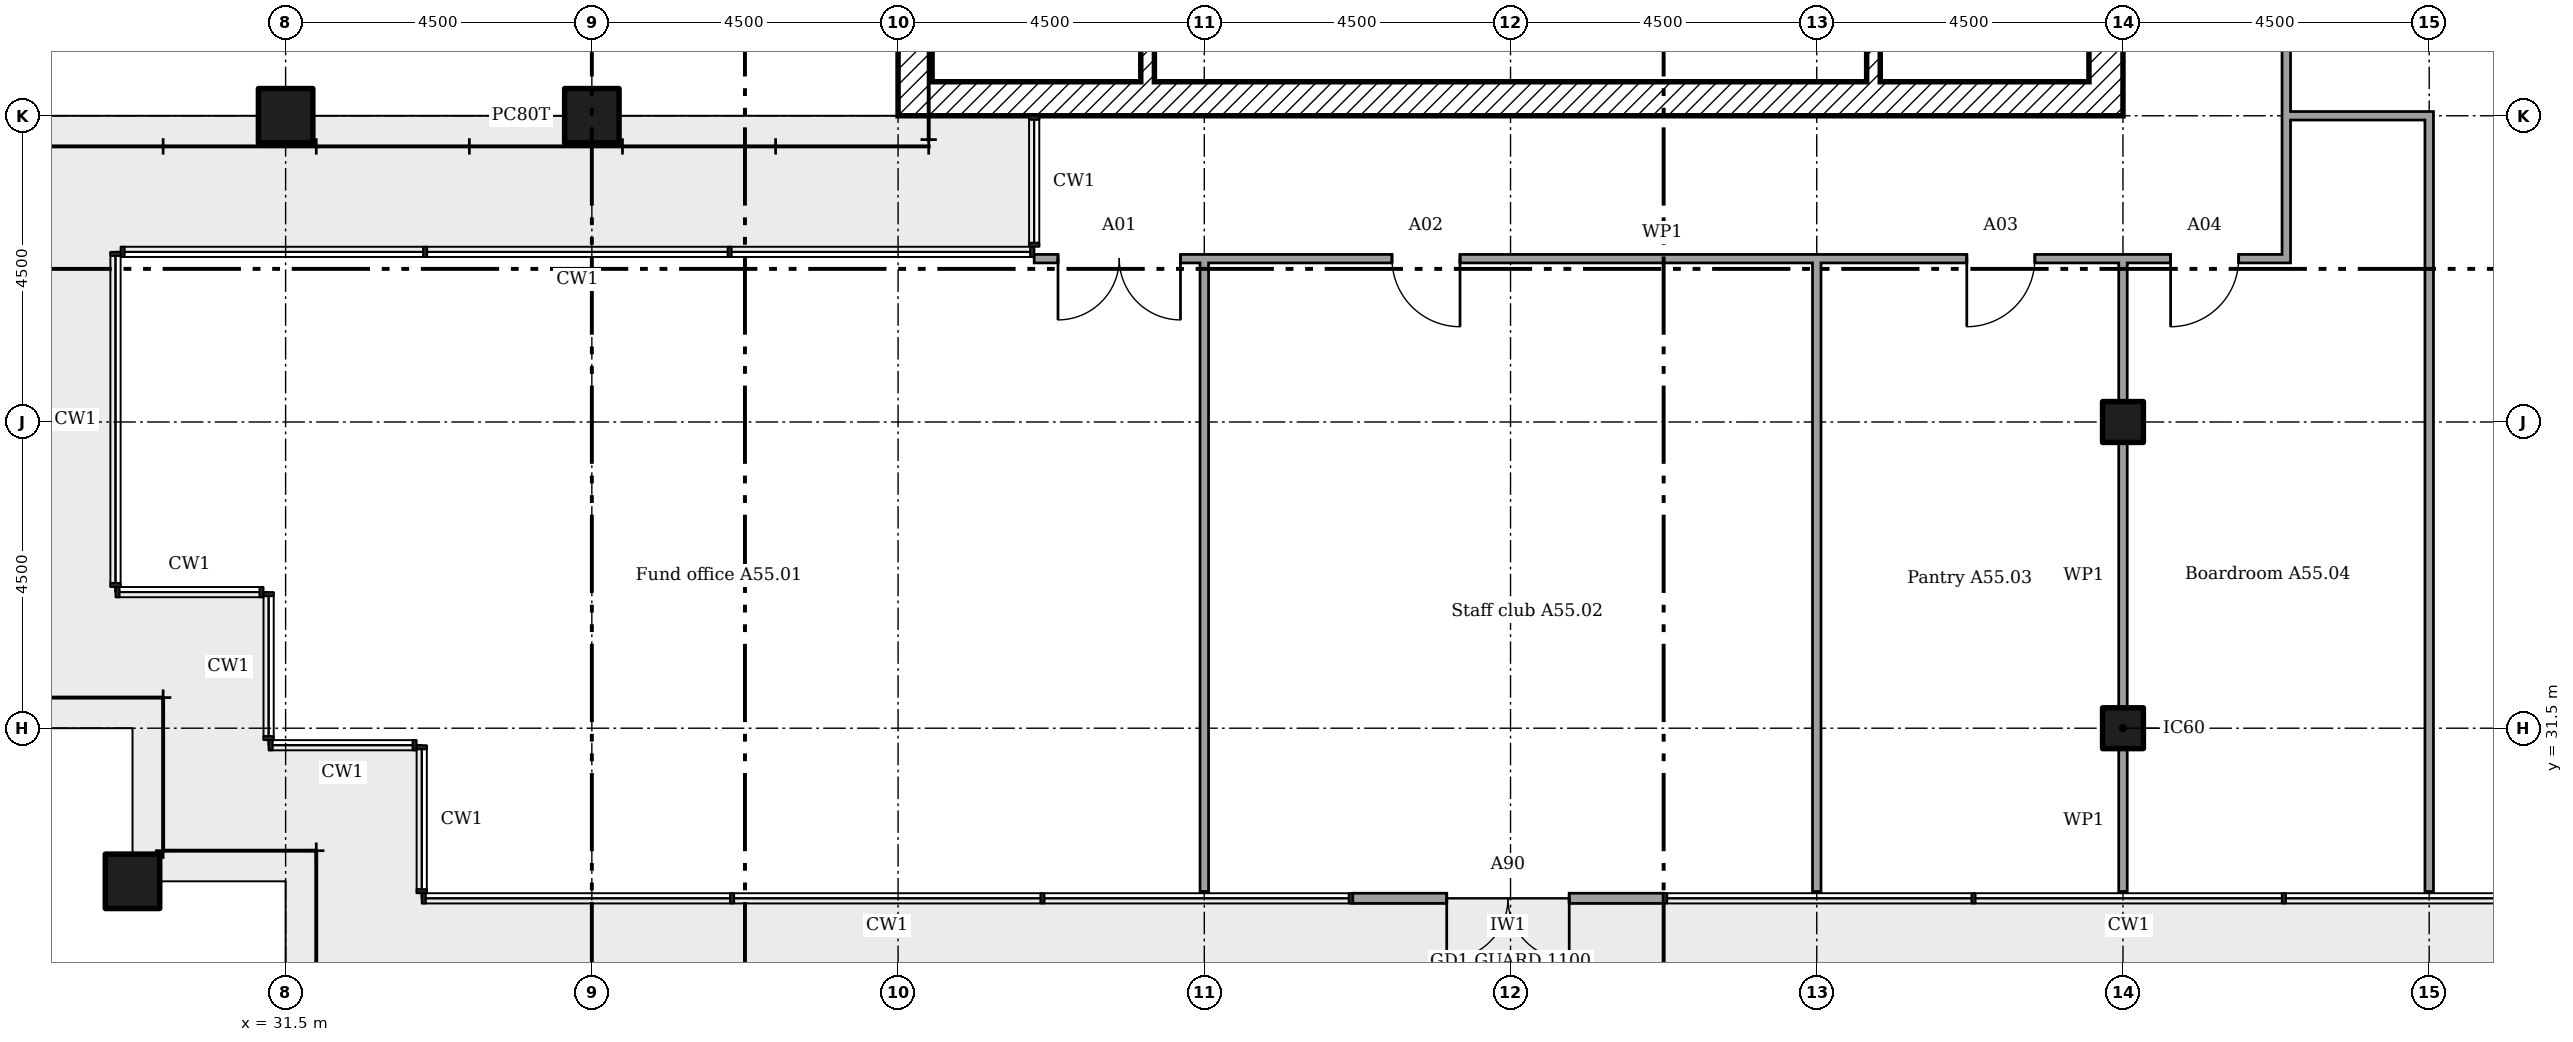
"""IFC4 building model, lengths in metres.
Left out: names, types, materials, properties, quantities, classifications, styles, units other than length and angle.
Written with IfcOpenShell. Run it as: python <this file> out.ifc"""

import sys

from ifc_helpers import new_model, si_unit, direction, frame, frame_2d, origin, origin_2d, place, context, subcontext, project, spatial, rectangle, extrude, element, fill, save


model = new_model("IFC4")
c1 = context("Model", 3, precision=1e-05, world=origin(), true_north=direction((0.0, 1.0)))
c2 = subcontext(c1, "Body", "Model", "MODEL_VIEW")
j1 = project(units=[si_unit("LENGTHUNIT", "METRE"), si_unit("PLANEANGLEUNIT", "RADIAN")], contexts=[c1])
p1 = place(None, origin())
s1 = spatial("IfcSite", under=j1, at=p1, CompositionType="ELEMENT")
p2 = place(p1, origin())
s2 = spatial("IfcBuilding", under=s1, at=p2, CompositionType="ELEMENT")
p3 = place(p2, frame((0.0, 0.0, 217.2)))
s3 = spatial("IfcBuildingStorey", under=s2, at=p3, CompositionType="ELEMENT", Elevation=217.2)
for number, where in (
    (1, (36.0, 40.5, 0.0)),
    (2, (31.5, 40.5, 0.0)),
    (3, (29.25, 29.25, 0.0)),
):
    element("IfcColumn", number, at=place(p3, frame(where)), inside=s3, PredefinedType="COLUMN", context=c2, shape_type="SweptSolid", body=[
        extrude(rectangle(XDim=0.8, YDim=0.8, at=origin_2d()), origin(), (0.0, 0.0, 1.0), 3.6),
    ])
for number, where in (
    (4, (58.5, 31.5, 0.0)),
    (5, (58.5, 36.0, 0.0)),
):
    element("IfcColumn", number, at=place(p3, frame(where)), inside=s3, PredefinedType="COLUMN", context=c2, shape_type="SweptSolid", body=[
        extrude(rectangle(XDim=0.6, YDim=0.6, at=origin_2d()), origin(), (0.0, 0.0, 1.0), 3.6),
    ])
p4 = place(p3, frame((47.182, 29.0, 0.0)))
e6 = element("IfcWall", 6, at=p4, inside=s3, PredefinedType="SOLIDWALL", context=c2, shape_type="SweptSolid", body=[
    extrude(rectangle(XDim=4.561, YDim=0.15, at=frame_2d((2.28, 0.0))), origin(), (0.0, 0.0, 1.0), 3.45),
])
p5 = place(p4, frame((1.38, 0.0, 0.0)))
e7 = element("IfcOpeningElement", 7, at=p5, cuts=e6, PredefinedType="OPENING", context=c2, shape_type="SweptSolid", body=[
    extrude(rectangle(XDim=1.8, YDim=2.4, at=frame_2d((0.9, 1.2))), frame((0.0, 0.085, 0.0), z_axis=(0.0, -1.0, 0.0), x_axis=(1.0, 0.0, 0.0)), (0.0, 0.0, 1.0), 0.17),
])
p6 = place(p3, frame((58.25, 40.5, 0.0), z_axis=(0.0, 0.0, 1.0), x_axis=(0.0, 1.0, 0.0)))
e8 = element("IfcWall", 8, at=p6, inside=s3, PredefinedType="SHEAR", context=c2, shape_type="SweptSolid", body=[
    extrude(rectangle(XDim=18.0, YDim=0.5, at=frame_2d((9.0, 0.0))), origin(), (0.0, 0.0, 1.0), 3.35),
])
p7 = place(p6, frame((13.15, 0.0, 0.0)))
e9 = element("IfcOpeningElement", 9, at=p7, cuts=e8, PredefinedType="OPENING", context=c2, shape_type="SweptSolid", body=[
    extrude(rectangle(XDim=1.2, YDim=2.1, at=frame_2d((0.6, 1.05))), frame((0.0, 0.26, 0.0), z_axis=(0.0, -1.0, 0.0), x_axis=(1.0, 0.0, 0.0)), (0.0, 0.0, 1.0), 0.52),
])
p8 = place(p6, frame((3.9, 0.0, 0.0)))
e10 = element("IfcOpeningElement", 10, at=p8, cuts=e8, PredefinedType="OPENING", context=c2, shape_type="SweptSolid", body=[
    extrude(rectangle(XDim=1.8, YDim=2.1, at=frame_2d((0.9, 1.05))), frame((0.0, 0.26, 0.0), z_axis=(0.0, -1.0, 0.0), x_axis=(1.0, 0.0, 0.0)), (0.0, 0.0, 1.0), 0.52),
])
p9 = place(p6, frame((11.525, 0.0, 0.0)))
e11 = element("IfcOpeningElement", 11, at=p9, cuts=e8, PredefinedType="OPENING", context=c2, shape_type="SweptSolid", body=[
    extrude(rectangle(XDim=1.0, YDim=2.1, at=frame_2d((0.5, 1.05))), frame((0.0, 0.26, 0.0), z_axis=(0.0, -1.0, 0.0), x_axis=(1.0, 0.0, 0.0)), (0.0, 0.0, 1.0), 0.52),
])
p10 = place(p3, frame((40.5, 40.75, 0.0)))
e12 = element("IfcWall", 12, at=p10, inside=s3, PredefinedType="SHEAR", context=c2, shape_type="SweptSolid", body=[
    extrude(rectangle(XDim=17.5, YDim=0.5, at=frame_2d((8.75, 0.0))), origin(), (0.0, 0.0, 1.0), 3.35),
])
p11 = place(p3, frame((40.75, 41.0, 0.0), z_axis=(0.0, 0.0, 1.0), x_axis=(0.0, 1.0, 0.0)))
e13 = element("IfcWall", 13, at=p11, inside=s3, PredefinedType="SHEAR", context=c2, shape_type="SweptSolid", body=[
    extrude(rectangle(XDim=17.0, YDim=0.5, at=frame_2d((8.5, 0.0))), origin(), (0.0, 0.0, 1.0), 3.35),
])
for number, where, z_axis, x_axis in (
    (14, (44.167, 41.0, 0.0), (0.0, 0.0, 1.0), (0.0, 1.0, 0.0)),
    (15, (54.833, 41.0, 0.0), (0.0, 0.0, 1.0), (0.0, 1.0, 0.0)),
):
    element("IfcWall", number, at=place(p3, frame(where, z_axis=z_axis, x_axis=x_axis)), inside=s3, PredefinedType="SHEAR", context=c2, shape_type="SweptSolid", body=[
        extrude(rectangle(XDim=2.8, YDim=0.2, at=frame_2d((1.4, 0.0))), origin(), (0.0, 0.0, 1.0), 3.35),
    ])
p12 = place(p3, frame((42.5, 38.4, 0.0)))
e16 = element("IfcWall", 16, at=p12, inside=s3, PredefinedType="PARTITIONING", context=c2, shape_type="SweptSolid", body=[
    extrude(rectangle(XDim=18.462, YDim=0.125, at=frame_2d((9.231, 0.0))), origin(), (0.0, 0.0, 1.0), 3.45),
])
p13 = place(p12, frame((0.35, 0.0, 0.0)))
e17 = element("IfcOpeningElement", 17, at=p13, cuts=e16, PredefinedType="OPENING", context=c2, shape_type="SweptSolid", body=[
    extrude(rectangle(XDim=1.8, YDim=2.1, at=frame_2d((0.9, 1.05))), frame((0.0, 0.073, 0.0), z_axis=(0.0, -1.0, 0.0), x_axis=(1.0, 0.0, 0.0)), (0.0, 0.0, 1.0), 0.145),
])
p14 = place(p12, frame((5.258, 0.0, 0.0)))
e18 = element("IfcOpeningElement", 18, at=p14, cuts=e16, PredefinedType="OPENING", context=c2, shape_type="SweptSolid", body=[
    extrude(rectangle(XDim=1.0, YDim=2.1, at=frame_2d((0.5, 1.05))), frame((0.0, 0.073, 0.0), z_axis=(0.0, -1.0, 0.0), x_axis=(1.0, 0.0, 0.0)), (0.0, 0.0, 1.0), 0.145),
])
p15 = place(p12, frame((13.705, 0.0, 0.0)))
e19 = element("IfcOpeningElement", 19, at=p15, cuts=e16, PredefinedType="OPENING", context=c2, shape_type="SweptSolid", body=[
    extrude(rectangle(XDim=1.0, YDim=2.1, at=frame_2d((0.5, 1.05))), frame((0.0, 0.073, 0.0), z_axis=(0.0, -1.0, 0.0), x_axis=(1.0, 0.0, 0.0)), (0.0, 0.0, 1.0), 0.145),
])
p16 = place(p12, frame((16.7, 0.0, 0.0)))
e20 = element("IfcOpeningElement", 20, at=p16, cuts=e16, PredefinedType="OPENING", context=c2, shape_type="SweptSolid", body=[
    extrude(rectangle(XDim=1.0, YDim=2.1, at=frame_2d((0.5, 1.05))), frame((0.0, 0.073, 0.0), z_axis=(0.0, -1.0, 0.0), x_axis=(1.0, 0.0, 0.0)), (0.0, 0.0, 1.0), 0.145),
])
p17 = place(p3, frame((60.9, 40.5, 0.0)))
e21 = element("IfcWall", 21, at=p17, inside=s3, PredefinedType="PARTITIONING", context=c2, shape_type="SweptSolid", body=[
    extrude(rectangle(XDim=2.163, YDim=0.125, at=frame_2d((1.081, 0.0))), origin(), (0.0, 0.0, 1.0), 2.772),
])
for number, where, z_axis, x_axis in (
    (22, (45.0, 29.1, 0.0), (0.0, 0.0, 1.0), (0.0, 1.0, 0.0)),
    (23, (54.0, 29.1, 0.0), (0.0, 0.0, 1.0), (0.0, 1.0, 0.0)),
):
    element("IfcWall", number, at=place(p3, frame(where, z_axis=z_axis, x_axis=x_axis)), inside=s3, PredefinedType="PARTITIONING", context=c2, shape_type="SweptSolid", body=[
        extrude(rectangle(XDim=9.3, YDim=0.125, at=frame_2d((4.65, 0.0))), origin(), (0.0, 0.0, 1.0), 2.772),
    ])
p18 = place(p3, frame((58.5, 29.1, 0.0), z_axis=(0.0, 0.0, 1.0), x_axis=(0.0, 1.0, 0.0)))
e24 = element("IfcWall", 24, at=p18, inside=s3, PredefinedType="PARTITIONING", context=c2, shape_type="SweptSolid", body=[
    extrude(rectangle(XDim=2.1, YDim=0.125, at=frame_2d((1.05, 0.0))), origin(), (0.0, 0.0, 1.0), 2.676),
])
p19 = place(p3, frame((58.5, 31.8, 0.0), z_axis=(0.0, 0.0, 1.0), x_axis=(0.0, 1.0, 0.0)))
e25 = element("IfcWall", 25, at=p19, inside=s3, PredefinedType="PARTITIONING", context=c2, shape_type="SweptSolid", body=[
    extrude(rectangle(XDim=3.9, YDim=0.125, at=frame_2d((1.95, 0.0))), origin(), (0.0, 0.0, 1.0), 2.676),
])
p20 = place(p3, frame((58.5, 36.3, 0.0), z_axis=(0.0, 0.0, 1.0), x_axis=(0.0, 1.0, 0.0)))
e26 = element("IfcWall", 26, at=p20, inside=s3, PredefinedType="PARTITIONING", context=c2, shape_type="SweptSolid", body=[
    extrude(rectangle(XDim=2.1, YDim=0.125, at=frame_2d((1.05, 0.0))), origin(), (0.0, 0.0, 1.0), 2.676),
])
p21 = place(p3, frame((60.9, 38.462, 0.0), z_axis=(0.0, 0.0, 1.0), x_axis=(0.0, 1.0, 0.0)))
e27 = element("IfcWall", 27, at=p21, inside=s3, PredefinedType="PARTITIONING", context=c2, shape_type="SweptSolid", body=[
    extrude(rectangle(XDim=9.775, YDim=0.125, at=frame_2d((4.888, 0.0))), origin(), (0.0, 0.0, 1.0), 3.45),
])
p22 = place(p21, frame((4.146, 0.0, 0.0)))
e28 = element("IfcOpeningElement", 28, at=p22, cuts=e27, PredefinedType="OPENING", context=c2, shape_type="SweptSolid", body=[
    extrude(rectangle(XDim=1.8, YDim=2.1, at=frame_2d((0.9, 1.05))), frame((0.0, 0.073, 0.0), z_axis=(0.0, -1.0, 0.0), x_axis=(1.0, 0.0, 0.0)), (0.0, 0.0, 1.0), 0.145),
])
p23 = place(p3, frame((63.0, 29.1, 0.0), z_axis=(0.0, 0.0, 1.0), x_axis=(0.0, 1.0, 0.0)))
e29 = element("IfcWall", 29, at=p23, inside=s3, PredefinedType="PARTITIONING", context=c2, shape_type="SweptSolid", body=[
    extrude(rectangle(XDim=11.337, YDim=0.125, at=frame_2d((5.669, 0.0))), origin(), (0.0, 0.0, 1.0), 3.45),
])
p24 = place(p5, frame((1.8, 0.0, 0.0), x_axis=(-1.0, 0.0, 0.0)))
e30 = element("IfcDoor", 30, at=p24, inside=s3, OperationType="DOUBLE_DOOR_DOUBLE_SWING", PredefinedType="NOTDEFINED", context=c2, shape_type="SweptSolid", body=[
    extrude(rectangle(XDim=1.8, YDim=2.4, at=frame_2d((0.9, 1.2))), frame((0.0, 0.025, 0.0), z_axis=(0.0, -1.0, 0.0), x_axis=(1.0, 0.0, 0.0)), (0.0, 0.0, 1.0), 0.05),
])
fill(e7, e30)
p25 = place(p13, frame((1.8, 0.0, 0.0), x_axis=(-1.0, 0.0, 0.0)))
e31 = element("IfcDoor", 31, at=p25, inside=s3, OperationType="DOUBLE_DOOR_SINGLE_SWING", PredefinedType="DOOR", context=c2, shape_type="SweptSolid", body=[
    extrude(rectangle(XDim=1.8, YDim=2.1, at=frame_2d((0.9, 1.05))), frame((0.0, 0.025, 0.0), z_axis=(0.0, -1.0, 0.0), x_axis=(1.0, 0.0, 0.0)), (0.0, 0.0, 1.0), 0.05),
])
fill(e17, e31)
p26 = place(p14, frame((1.0, 0.0, 0.0), x_axis=(-1.0, 0.0, 0.0)))
e32 = element("IfcDoor", 32, at=p26, inside=s3, OperationType="SINGLE_SWING_RIGHT", PredefinedType="DOOR", context=c2, shape_type="SweptSolid", body=[
    extrude(rectangle(XDim=1.0, YDim=2.1, at=frame_2d((0.5, 1.05))), frame((0.0, 0.025, 0.0), z_axis=(0.0, -1.0, 0.0), x_axis=(1.0, 0.0, 0.0)), (0.0, 0.0, 1.0), 0.05),
])
fill(e18, e32)
p27 = place(p15, frame((1.0, 0.0, 0.0), x_axis=(-1.0, 0.0, 0.0)))
e33 = element("IfcDoor", 33, at=p27, inside=s3, OperationType="SINGLE_SWING_LEFT", PredefinedType="DOOR", context=c2, shape_type="SweptSolid", body=[
    extrude(rectangle(XDim=1.0, YDim=2.1, at=frame_2d((0.5, 1.05))), frame((0.0, 0.025, 0.0), z_axis=(0.0, -1.0, 0.0), x_axis=(1.0, 0.0, 0.0)), (0.0, 0.0, 1.0), 0.05),
])
fill(e19, e33)
p28 = place(p16, frame((1.0, 0.0, 0.0), x_axis=(-1.0, 0.0, 0.0)))
e34 = element("IfcDoor", 34, at=p28, inside=s3, OperationType="SINGLE_SWING_LEFT", PredefinedType="DOOR", context=c2, shape_type="SweptSolid", body=[
    extrude(rectangle(XDim=1.0, YDim=2.1, at=frame_2d((0.5, 1.05))), frame((0.0, 0.025, 0.0), z_axis=(0.0, -1.0, 0.0), x_axis=(1.0, 0.0, 0.0)), (0.0, 0.0, 1.0), 0.05),
])
fill(e20, e34)
save(model, sys.argv[1])
